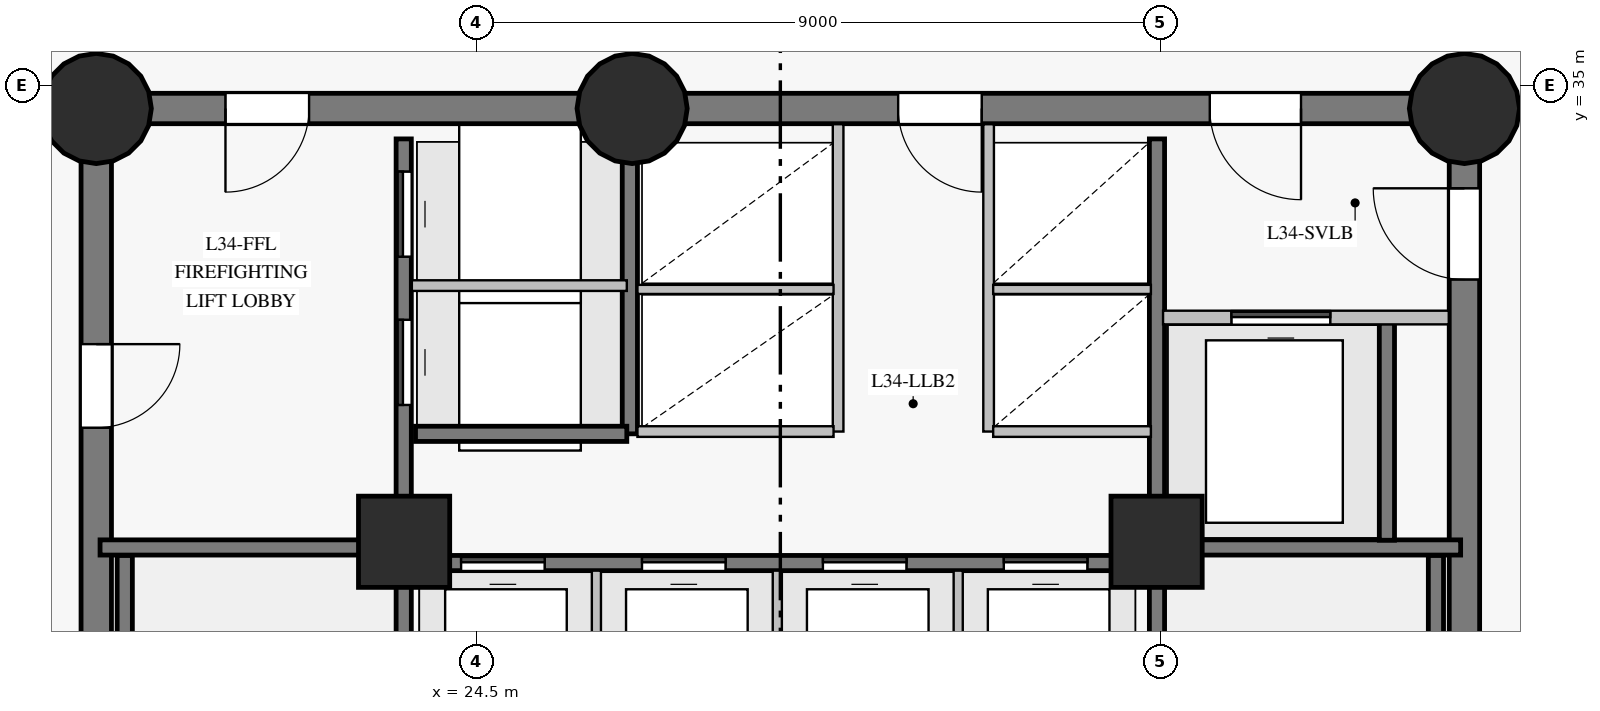
"""IFC4 building model, lengths in metres.
Left out: names, types, materials, properties, quantities, classifications, styles, units other than length and angle.
Written with IfcOpenShell. Run it as: python <this file> out.ifc"""

import sys

from ifc_helpers import new_model, si_unit, direction, frame, frame_2d, origin, origin_with_axes, origin_2d, place, context, subcontext, project, spatial, rectangle, circle, extrude, source, transform, mapped, element, fill, save


model = new_model("IFC4")
c1 = context("Model", 3, precision=1e-05, world=origin(), true_north=direction((0.0, 1.0)))
c2 = subcontext(c1, "Body", "Model", "MODEL_VIEW")
j1 = project(units=[si_unit("LENGTHUNIT", "METRE"), si_unit("PLANEANGLEUNIT", "RADIAN")], contexts=[c1])
p1 = place(None, origin())
s1 = spatial("IfcSite", under=j1, at=p1, CompositionType="ELEMENT")
p2 = place(p1, origin())
s2 = spatial("IfcBuilding", under=s1, at=p2, CompositionType="ELEMENT")
p3 = place(p2, frame((0.0, 0.0, 123.65)))
s3 = spatial("IfcBuildingStorey", under=s2, at=p3, CompositionType="ELEMENT", Elevation=123.65)
p4 = place(p3, frame((37.5, 18.3, 0.0), z_axis=(0.0, 0.0, 1.0), x_axis=(0.0, 1.0, 0.0)))
e1 = element("IfcWall", 1, at=p4, inside=s3, PredefinedType="SHEAR", context=c2, shape_type="SweptSolid", body=[
    extrude(rectangle(XDim=16.4, YDim=0.4, at=frame_2d((8.2, 0.0))), origin(), (0.0, 0.0, 1.0), 2.825),
])
p5 = place(p4, frame((14.15, 0.0, 0.0)))
e2 = element("IfcOpeningElement", 2, at=p5, cuts=e1, PredefinedType="OPENING", context=c2, shape_type="SweptSolid", body=[
    extrude(rectangle(XDim=1.2, YDim=2.15, at=frame_2d((0.6, 1.075))), frame((0.0, 0.21, 0.0), z_axis=(0.0, -1.0, 0.0), x_axis=(1.0, 0.0, 0.0)), (0.0, 0.0, 1.0), 0.42),
])
p6 = place(p3, frame((37.5, 34.7, 0.0), z_axis=(0.0, 0.0, 1.0), x_axis=(-1.0, 0.0, 0.0)))
e3 = element("IfcWall", 3, at=p6, inside=s3, PredefinedType="SHEAR", context=c2, shape_type="SweptSolid", body=[
    extrude(rectangle(XDim=10.95, YDim=0.4, at=frame_2d((5.475, 0.0))), origin(), (0.0, 0.0, 1.0), 2.825),
])
p7 = place(p6, frame((2.15, 0.0, 0.0)))
e4 = element("IfcOpeningElement", 4, at=p7, cuts=e3, PredefinedType="OPENING", context=c2, shape_type="SweptSolid", body=[
    extrude(rectangle(XDim=1.2, YDim=2.15, at=frame_2d((0.6, 1.075))), frame((0.0, 0.21, 0.0), z_axis=(0.0, -1.0, 0.0), x_axis=(1.0, 0.0, 0.0)), (0.0, 0.0, 1.0), 0.42),
])
p8 = place(p6, frame((6.35, 0.0, 0.0)))
e5 = element("IfcOpeningElement", 5, at=p8, cuts=e3, PredefinedType="OPENING", context=c2, shape_type="SweptSolid", body=[
    extrude(rectangle(XDim=1.1, YDim=2.15, at=frame_2d((0.55, 1.075))), frame((0.0, 0.21, 0.0), z_axis=(0.0, -1.0, 0.0), x_axis=(1.0, 0.0, 0.0)), (0.0, 0.0, 1.0), 0.42),
])
p9 = place(p3, frame((26.55, 34.7, 0.0), z_axis=(0.0, 0.0, 1.0), x_axis=(-1.0, 0.0, 0.0)))
e6 = element("IfcWall", 6, at=p9, inside=s3, PredefinedType="SHEAR", context=c2, shape_type="SweptSolid", body=[
    extrude(rectangle(XDim=7.05, YDim=0.4, at=frame_2d((3.525, 0.0))), origin(), (0.0, 0.0, 1.0), 2.825),
])
p10 = place(p9, frame((4.25, 0.0, 0.0)))
e7 = element("IfcOpeningElement", 7, at=p10, cuts=e6, PredefinedType="OPENING", context=c2, shape_type="SweptSolid", body=[
    extrude(rectangle(XDim=1.1, YDim=2.15, at=frame_2d((0.55, 1.075))), frame((0.0, 0.21, 0.0), z_axis=(0.0, -1.0, 0.0), x_axis=(1.0, 0.0, 0.0)), (0.0, 0.0, 1.0), 0.42),
])
p11 = place(p3, frame((19.5, 34.7, 0.0), z_axis=(0.0, 0.0, 1.0), x_axis=(0.0, -1.0, 0.0)))
e8 = element("IfcWall", 8, at=p11, inside=s3, PredefinedType="SHEAR", context=c2, shape_type="SweptSolid", body=[
    extrude(rectangle(XDim=16.4, YDim=0.4, at=frame_2d((8.2, 0.0))), origin(), (0.0, 0.0, 1.0), 2.825),
])
p12 = place(p11, frame((3.1, 0.0, 0.0)))
e9 = element("IfcOpeningElement", 9, at=p12, cuts=e8, PredefinedType="OPENING", context=c2, shape_type="SweptSolid", body=[
    extrude(rectangle(XDim=1.1, YDim=2.15, at=frame_2d((0.55, 1.075))), frame((0.0, 0.21, 0.0), z_axis=(0.0, -1.0, 0.0), x_axis=(1.0, 0.0, 0.0)), (0.0, 0.0, 1.0), 0.42),
])
m1 = source(origin_with_axes(), c2, "Body", "SweptSolid", [
    extrude(circle(Radius=0.725, at=origin_2d()), origin(), (0.0, 0.0, 1.0), 3.05),
])
for number, where, z_axis, x_axis in (
    (10, (19.5, 34.7, 0.0), (0.0, 0.0, 1.0), (1.0, 0.0, 0.0)),
    (11, (26.55, 34.7, 0.0), (0.0, 0.0, 1.0), (1.0, 0.0, 0.0)),
    (12, (37.5, 34.7, 0.0), (0.0, 0.0, 1.0), (1.0, 0.0, 0.0)),
):
    element("IfcColumn", number, at=place(p3, frame(where, z_axis=z_axis, x_axis=x_axis)), inside=s3, PredefinedType="COLUMN", context=c2, shape_type="MappedRepresentation", body=[
        mapped(m1, transform((0.0, 0.0, 0.0), scale=1.0)),
    ])
m2 = source(origin_with_axes(), c2, "Body", "SweptSolid", [
    extrude(rectangle(XDim=1.2, YDim=1.2, at=origin_2d()), origin(), (0.0, 0.0, 1.0), 3.05),
])
for number, where, z_axis, x_axis in (
    (13, (23.55, 29.0, 0.0), (0.0, 0.0, 1.0), (1.0, 0.0, 0.0)),
    (14, (33.45, 29.0, 0.0), (0.0, 0.0, 1.0), (1.0, 0.0, 0.0)),
):
    element("IfcColumn", number, at=place(p3, frame(where, z_axis=z_axis, x_axis=x_axis)), inside=s3, PredefinedType="COLUMN", context=c2, shape_type="MappedRepresentation", body=[
        mapped(m2, transform((0.0, 0.0, 0.0), scale=1.0)),
    ])
p13 = place(p3, frame((23.545, 18.7, 0.0), z_axis=(0.0, 0.0, 1.0), x_axis=(0.0, 1.0, 0.0)))
e15 = element("IfcWall", 15, at=p13, inside=s3, PredefinedType="SHEAR", context=c2, shape_type="SweptSolid", body=[
    extrude(rectangle(XDim=15.6, YDim=0.2, at=frame_2d((7.8, 0.0))), origin(), (0.0, 0.0, 1.0), 2.825),
])
p14 = place(p13, frame((2.75, 0.0, 0.0)))
e16 = element("IfcOpeningElement", 16, at=p14, cuts=e15, PredefinedType="OPENING", context=c2, shape_type="SweptSolid", body=[
    extrude(rectangle(XDim=1.15, YDim=2.15, at=frame_2d((0.575, 1.075))), frame((0.0, 0.11, 0.0), z_axis=(0.0, -1.0, 0.0), x_axis=(1.0, 0.0, 0.0)), (0.0, 0.0, 1.0), 0.22),
])
p15 = place(p13, frame((0.14, 0.0, 0.0)))
e17 = element("IfcOpeningElement", 17, at=p15, cuts=e15, PredefinedType="OPENING", context=c2, shape_type="SweptSolid", body=[
    extrude(rectangle(XDim=0.88, YDim=2.1, at=frame_2d((0.44, 1.05))), frame((0.0, 0.11, 0.0), z_axis=(0.0, -1.0, 0.0), x_axis=(1.0, 0.0, 0.0)), (0.0, 0.0, 1.0), 0.22),
])
p16 = place(p13, frame((1.36, 0.0, 0.0)))
e18 = element("IfcOpeningElement", 18, at=p16, cuts=e15, PredefinedType="OPENING", context=c2, shape_type="SweptSolid", body=[
    extrude(rectangle(XDim=0.88, YDim=2.1, at=frame_2d((0.44, 1.05))), frame((0.0, 0.11, 0.0), z_axis=(0.0, -1.0, 0.0), x_axis=(1.0, 0.0, 0.0)), (0.0, 0.0, 1.0), 0.22),
])
p17 = place(p13, frame((12.1, 0.0, 0.0)))
e19 = element("IfcOpeningElement", 19, at=p17, cuts=e15, PredefinedType="OPENING", context=c2, shape_type="SweptSolid", body=[
    extrude(rectangle(XDim=1.12, YDim=2.15, at=frame_2d((0.56, 1.075))), frame((0.0, 0.11, 0.0), z_axis=(0.0, -1.0, 0.0), x_axis=(1.0, 0.0, 0.0)), (0.0, 0.0, 1.0), 0.22),
])
p18 = place(p13, frame((14.05, 0.0, 0.0)))
e20 = element("IfcOpeningElement", 20, at=p18, cuts=e15, PredefinedType="OPENING", context=c2, shape_type="SweptSolid", body=[
    extrude(rectangle(XDim=1.12, YDim=2.15, at=frame_2d((0.56, 1.075))), frame((0.0, 0.11, 0.0), z_axis=(0.0, -1.0, 0.0), x_axis=(1.0, 0.0, 0.0)), (0.0, 0.0, 1.0), 0.22),
])
p19 = place(p3, frame((33.455, 18.7, 0.0), z_axis=(0.0, 0.0, 1.0), x_axis=(0.0, 1.0, 0.0)))
e21 = element("IfcWall", 21, at=p19, inside=s3, PredefinedType="SHEAR", context=c2, shape_type="SweptSolid", body=[
    extrude(rectangle(XDim=15.6, YDim=0.2, at=frame_2d((7.8, 0.0))), origin(), (0.0, 0.0, 1.0), 2.825),
])
p20 = place(p19, frame((2.75, 0.0, 0.0)))
e22 = element("IfcOpeningElement", 22, at=p20, cuts=e21, PredefinedType="OPENING", context=c2, shape_type="SweptSolid", body=[
    extrude(rectangle(XDim=1.15, YDim=2.15, at=frame_2d((0.575, 1.075))), frame((0.0, 0.11, 0.0), z_axis=(0.0, -1.0, 0.0), x_axis=(1.0, 0.0, 0.0)), (0.0, 0.0, 1.0), 0.22),
])
p21 = place(p19, frame((0.55, 0.0, 0.0)))
e23 = element("IfcOpeningElement", 23, at=p21, cuts=e21, PredefinedType="OPENING", context=c2, shape_type="SweptSolid", body=[
    extrude(rectangle(XDim=0.94, YDim=2.1, at=frame_2d((0.47, 1.05))), frame((0.0, 0.11, 0.0), z_axis=(0.0, -1.0, 0.0), x_axis=(1.0, 0.0, 0.0)), (0.0, 0.0, 1.0), 0.22),
])
p22 = place(p3, frame((23.7, 28.72, 0.0), z_axis=(0.0, 0.0, 1.0), x_axis=(1.0, 0.0, 0.0)))
e24 = element("IfcWall", 24, at=p22, inside=s3, PredefinedType="SHEAR", context=c2, shape_type="SweptSolid", body=[
    extrude(rectangle(XDim=9.6, YDim=0.2, at=frame_2d((4.8, 0.0))), origin(), (0.0, 0.0, 1.0), 2.825),
])
p23 = place(p22, frame((0.6, 0.0, 0.0)))
e25 = element("IfcOpeningElement", 25, at=p23, cuts=e24, PredefinedType="OPENING", context=c2, shape_type="SweptSolid", body=[
    extrude(rectangle(XDim=1.1, YDim=2.15, at=frame_2d((0.55, 1.075))), frame((0.0, 0.11, 0.0), z_axis=(0.0, -1.0, 0.0), x_axis=(1.0, 0.0, 0.0)), (0.0, 0.0, 1.0), 0.22),
])
p24 = place(p22, frame((2.98, 0.0, 0.0)))
e26 = element("IfcOpeningElement", 26, at=p24, cuts=e24, PredefinedType="OPENING", context=c2, shape_type="SweptSolid", body=[
    extrude(rectangle(XDim=1.1, YDim=2.15, at=frame_2d((0.55, 1.075))), frame((0.0, 0.11, 0.0), z_axis=(0.0, -1.0, 0.0), x_axis=(1.0, 0.0, 0.0)), (0.0, 0.0, 1.0), 0.22),
])
p25 = place(p22, frame((5.36, 0.0, 0.0)))
e27 = element("IfcOpeningElement", 27, at=p25, cuts=e24, PredefinedType="OPENING", context=c2, shape_type="SweptSolid", body=[
    extrude(rectangle(XDim=1.1, YDim=2.15, at=frame_2d((0.55, 1.075))), frame((0.0, 0.11, 0.0), z_axis=(0.0, -1.0, 0.0), x_axis=(1.0, 0.0, 0.0)), (0.0, 0.0, 1.0), 0.22),
])
p26 = place(p22, frame((7.74, 0.0, 0.0)))
e28 = element("IfcOpeningElement", 28, at=p26, cuts=e24, PredefinedType="OPENING", context=c2, shape_type="SweptSolid", body=[
    extrude(rectangle(XDim=1.1, YDim=2.15, at=frame_2d((0.55, 1.075))), frame((0.0, 0.11, 0.0), z_axis=(0.0, -1.0, 0.0), x_axis=(1.0, 0.0, 0.0)), (0.0, 0.0, 1.0), 0.22),
])
for number, where, z_axis, x_axis in (
    (29, (19.875, 21.32, 0.0), (0.0, 0.0, 1.0), (0.0, 1.0, 0.0)),
    (30, (37.125, 21.32, 0.0), (0.0, 0.0, 1.0), (0.0, 1.0, 0.0)),
):
    element("IfcWall", number, at=place(p3, frame(where, z_axis=z_axis, x_axis=x_axis)), inside=s3, PredefinedType="SHEAR", context=c2, shape_type="SweptSolid", body=[
        extrude(rectangle(XDim=7.5, YDim=0.2, at=frame_2d((3.75, 0.0))), origin(), (0.0, 0.0, 1.0), 2.825),
    ])
for number, where, z_axis, x_axis in (
    (31, (33.455, 28.925, 0.0), (0.0, 0.0, 1.0), (1.0, 0.0, 0.0)),
    (32, (19.55, 28.925, 0.0), (0.0, 0.0, 1.0), (1.0, 0.0, 0.0)),
):
    element("IfcWall", number, at=place(p3, frame(where, z_axis=z_axis, x_axis=x_axis)), inside=s3, PredefinedType="SHEAR", context=c2, shape_type="SweptSolid", body=[
        extrude(rectangle(XDim=3.995, YDim=0.2, at=frame_2d((1.998, 0.0))), origin(), (0.0, 0.0, 1.0), 2.825),
    ])
p27 = place(p3, frame((26.52, 30.42, 0.0), z_axis=(0.0, 0.0, 1.0), x_axis=(0.0, 1.0, 0.0)))
e33 = element("IfcWall", 33, at=p27, inside=s3, PredefinedType="SHEAR", context=c2, shape_type="SweptSolid", body=[
    extrude(rectangle(XDim=3.86, YDim=0.2, at=frame_2d((1.93, 0.0))), origin(), (0.0, 0.0, 1.0), 2.825),
])
p28 = place(p3, frame((36.48, 29.02, 0.0), z_axis=(0.0, 0.0, 1.0), x_axis=(0.0, 1.0, 0.0)))
e34 = element("IfcWall", 34, at=p28, inside=s3, PredefinedType="SHEAR", context=c2, shape_type="SweptSolid", body=[
    extrude(rectangle(XDim=2.86, YDim=0.2, at=frame_2d((1.43, 0.0))), origin(), (0.0, 0.0, 1.0), 2.825),
])
p29 = place(p3, frame((23.7, 30.42, 0.0), z_axis=(0.0, 0.0, 1.0), x_axis=(1.0, 0.0, 0.0)))
e35 = element("IfcWall", 35, at=p29, inside=s3, PredefinedType="SHEAR", context=c2, shape_type="SweptSolid", body=[
    extrude(rectangle(XDim=2.78, YDim=0.2, at=frame_2d((1.39, 0.0))), origin(), (0.0, 0.0, 1.0), 2.825),
])
for number, where, z_axis, x_axis in (
    (36, (29.26, 30.45, 0.0), (0.0, 0.0, 1.0), (0.0, 1.0, 0.0)),
    (37, (31.24, 30.45, 0.0), (0.0, 0.0, 1.0), (0.0, 1.0, 0.0)),
):
    element("IfcWall", number, at=place(p3, frame(where, z_axis=z_axis, x_axis=x_axis)), inside=s3, PredefinedType="PARTITIONING", context=c2, shape_type="SweptSolid", body=[
        extrude(rectangle(XDim=4.043, YDim=0.14, at=frame_2d((2.021, 0.0))), origin(), (0.0, 0.0, 1.0), 2.825),
    ])
p30 = place(p3, frame((33.535, 31.95, 0.0), z_axis=(0.0, 0.0, 1.0), x_axis=(1.0, 0.0, 0.0)))
e38 = element("IfcWall", 38, at=p30, inside=s3, PredefinedType="PARTITIONING", context=c2, shape_type="SweptSolid", body=[
    extrude(rectangle(XDim=3.759, YDim=0.18, at=frame_2d((1.879, 0.0))), origin(), (0.0, 0.0, 1.0), 2.825),
])
p31 = place(p30, frame((0.9, 0.0, 0.0)))
e39 = element("IfcOpeningElement", 39, at=p31, cuts=e38, PredefinedType="OPENING", context=c2, shape_type="SweptSolid", body=[
    extrude(rectangle(XDim=1.3, YDim=2.2, at=frame_2d((0.65, 1.1))), frame((0.0, 0.1, 0.0), z_axis=(0.0, -1.0, 0.0), x_axis=(1.0, 0.0, 0.0)), (0.0, 0.0, 1.0), 0.2),
])
p32 = place(p3, frame((23.652, 32.37, 0.0), z_axis=(0.0, 0.0, 1.0), x_axis=(1.0, 0.0, 0.0)))
e40 = element("IfcWall", 40, at=p32, inside=s3, PredefinedType="PARTITIONING", context=c2, shape_type="SweptSolid", body=[
    extrude(rectangle(XDim=2.828, YDim=0.14, at=frame_2d((1.414, 0.0))), origin(), (0.0, 0.0, 1.0), 2.825),
])
for number, where, z_axis, x_axis in (
    (41, (26.08, 26.02, 0.0), (0.0, 0.0, 1.0), (0.0, 1.0, 0.0)),
    (42, (28.46, 26.02, 0.0), (0.0, 0.0, 1.0), (0.0, 1.0, 0.0)),
    (43, (30.84, 26.02, 0.0), (0.0, 0.0, 1.0), (0.0, 1.0, 0.0)),
):
    element("IfcWall", number, at=place(p3, frame(where, z_axis=z_axis, x_axis=x_axis)), inside=s3, PredefinedType="PARTITIONING", context=c2, shape_type="SweptSolid", body=[
        extrude(rectangle(XDim=2.6, YDim=0.12, at=frame_2d((1.3, 0.0))), origin(), (0.0, 0.0, 1.0), 2.825),
    ])
p33 = place(p3, frame((26.62, 30.45, 0.0), z_axis=(0.0, 0.0, 1.0), x_axis=(1.0, 0.0, 0.0)))
e44 = element("IfcWall", 44, at=p33, inside=s3, PredefinedType="PARTITIONING", context=c2, shape_type="SweptSolid", body=[
    extrude(rectangle(XDim=2.58, YDim=0.14, at=frame_2d((1.29, 0.0))), origin(), (0.0, 0.0, 1.0), 2.825),
])
p34 = place(p3, frame((26.62, 32.32, 0.0), z_axis=(0.0, 0.0, 1.0), x_axis=(1.0, 0.0, 0.0)))
e45 = element("IfcWall", 45, at=p34, inside=s3, PredefinedType="PARTITIONING", context=c2, shape_type="SweptSolid", body=[
    extrude(rectangle(XDim=2.58, YDim=0.12, at=frame_2d((1.29, 0.0))), origin(), (0.0, 0.0, 1.0), 2.825),
])
p35 = place(p3, frame((31.3, 30.45, 0.0), z_axis=(0.0, 0.0, 1.0), x_axis=(1.0, 0.0, 0.0)))
e46 = element("IfcWall", 46, at=p35, inside=s3, PredefinedType="PARTITIONING", context=c2, shape_type="SweptSolid", body=[
    extrude(rectangle(XDim=2.075, YDim=0.14, at=frame_2d((1.038, 0.0))), origin(), (0.0, 0.0, 1.0), 2.825),
])
p36 = place(p3, frame((31.3, 32.32, 0.0), z_axis=(0.0, 0.0, 1.0), x_axis=(1.0, 0.0, 0.0)))
e47 = element("IfcWall", 47, at=p36, inside=s3, PredefinedType="PARTITIONING", context=c2, shape_type="SweptSolid", body=[
    extrude(rectangle(XDim=2.075, YDim=0.12, at=frame_2d((1.038, 0.0))), origin(), (0.0, 0.0, 1.0), 2.825),
])
m3 = source(origin_with_axes(), c2, "Body", "SweptSolid", [
    extrude(rectangle(XDim=1.1, YDim=2.15, at=frame_2d((0.55, 1.075))), frame((0.0, 0.025, 0.0), z_axis=(0.0, -1.0, 0.0), x_axis=(1.0, 0.0, 0.0)), (0.0, 0.0, 1.0), 0.05),
])
p37 = place(p10, origin())
e48 = element("IfcDoor", 48, at=p37, inside=s3, OperationType="SINGLE_SWING_RIGHT", PredefinedType="DOOR", context=c2, shape_type="MappedRepresentation", body=[
    mapped(m3, transform((0.0, 0.0, 0.0), scale=1.0)),
])
fill(e7, e48)
p38 = place(p12, origin())
e49 = element("IfcDoor", 49, at=p38, inside=s3, OperationType="SINGLE_SWING_LEFT", PredefinedType="DOOR", context=c2, shape_type="MappedRepresentation", body=[
    mapped(m3, transform((0.0, 0.0, 0.0), scale=1.0)),
])
fill(e9, e49)
m4 = source(origin_with_axes(), c2, "Body", "SweptSolid", [
    extrude(rectangle(XDim=1.2, YDim=2.15, at=frame_2d((0.6, 1.075))), frame((0.0, 0.025, 0.0), z_axis=(0.0, -1.0, 0.0), x_axis=(1.0, 0.0, 0.0)), (0.0, 0.0, 1.0), 0.05),
])
p39 = place(p5, origin())
e50 = element("IfcDoor", 50, at=p39, inside=s3, OperationType="SINGLE_SWING_RIGHT", PredefinedType="DOOR", context=c2, shape_type="MappedRepresentation", body=[
    mapped(m4, transform((0.0, 0.0, 0.0), scale=1.0)),
])
fill(e2, e50)
p40 = place(p7, origin())
e51 = element("IfcDoor", 51, at=p40, inside=s3, OperationType="SINGLE_SWING_LEFT", PredefinedType="DOOR", context=c2, shape_type="MappedRepresentation", body=[
    mapped(m4, transform((0.0, 0.0, 0.0), scale=1.0)),
])
fill(e4, e51)
m5 = source(origin_with_axes(), c2, "Body", "SweptSolid", [
    extrude(rectangle(XDim=1.3, YDim=2.2, at=frame_2d((0.65, 1.1))), frame((0.0, 0.025, 0.0), z_axis=(0.0, -1.0, 0.0), x_axis=(1.0, 0.0, 0.0)), (0.0, 0.0, 1.0), 0.05),
])
p41 = place(p31, origin())
e52 = element("IfcDoor", 52, at=p41, inside=s3, OperationType="SLIDING_TO_LEFT", PredefinedType="DOOR", context=c2, shape_type="MappedRepresentation", body=[
    mapped(m5, transform((0.0, 0.0, 0.0), scale=1.0)),
])
fill(e39, e52)
p42 = place(p23, origin())
e53 = element("IfcDoor", 53, at=p42, inside=s3, OperationType="SLIDING_TO_LEFT", PredefinedType="DOOR", context=c2, shape_type="MappedRepresentation", body=[
    mapped(m3, transform((0.0, 0.0, 0.0), scale=1.0)),
])
fill(e25, e53)
p43 = place(p24, origin())
e54 = element("IfcDoor", 54, at=p43, inside=s3, OperationType="SLIDING_TO_RIGHT", PredefinedType="DOOR", context=c2, shape_type="MappedRepresentation", body=[
    mapped(m3, transform((0.0, 0.0, 0.0), scale=1.0)),
])
fill(e26, e54)
p44 = place(p25, origin())
e55 = element("IfcDoor", 55, at=p44, inside=s3, OperationType="SLIDING_TO_LEFT", PredefinedType="DOOR", context=c2, shape_type="MappedRepresentation", body=[
    mapped(m3, transform((0.0, 0.0, 0.0), scale=1.0)),
])
fill(e27, e55)
p45 = place(p26, origin())
e56 = element("IfcDoor", 56, at=p45, inside=s3, OperationType="SLIDING_TO_RIGHT", PredefinedType="DOOR", context=c2, shape_type="MappedRepresentation", body=[
    mapped(m3, transform((0.0, 0.0, 0.0), scale=1.0)),
])
fill(e28, e56)
p46 = place(p8, origin())
e57 = element("IfcDoor", 57, at=p46, inside=s3, OperationType="SINGLE_SWING_LEFT", PredefinedType="DOOR", context=c2, shape_type="MappedRepresentation", body=[
    mapped(m3, transform((0.0, 0.0, 0.0), scale=1.0)),
])
fill(e5, e57)
m6 = source(origin_with_axes(), c2, "Body", "SweptSolid", [
    extrude(rectangle(XDim=1.12, YDim=2.15, at=frame_2d((0.56, 1.075))), frame((0.0, 0.025, 0.0), z_axis=(0.0, -1.0, 0.0), x_axis=(1.0, 0.0, 0.0)), (0.0, 0.0, 1.0), 0.05),
])
p47 = place(p17, origin())
e58 = element("IfcDoor", 58, at=p47, inside=s3, OperationType="SLIDING_TO_LEFT", PredefinedType="DOOR", context=c2, shape_type="MappedRepresentation", body=[
    mapped(m6, transform((0.0, 0.0, 0.0), scale=1.0)),
])
fill(e19, e58)
p48 = place(p18, origin())
e59 = element("IfcDoor", 59, at=p48, inside=s3, OperationType="SLIDING_TO_RIGHT", PredefinedType="DOOR", context=c2, shape_type="MappedRepresentation", body=[
    mapped(m6, transform((0.0, 0.0, 0.0), scale=1.0)),
])
fill(e20, e59)
save(model, sys.argv[1])
